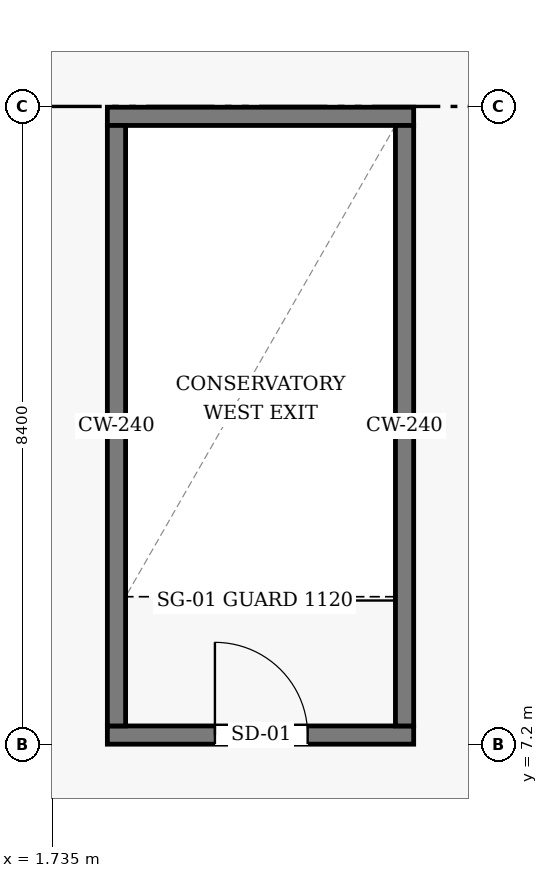
"""IFC4 building model, lengths in metres.
Left out: names, types, materials, properties, quantities, classifications, styles, units other than length and angle.
Written with IfcOpenShell. Run it as: python <this file> out.ifc"""

import sys

from ifc_helpers import new_model, si_unit, direction, frame, frame_2d, origin, place, context, subcontext, project, spatial, rectangle, extrude, element, fill, save


model = new_model("IFC4")
c1 = context("Model", 3, precision=1e-05, world=origin(), true_north=direction((0.0, 1.0)))
c2 = subcontext(c1, "Body", "Model", "MODEL_VIEW")
j1 = project(units=[si_unit("LENGTHUNIT", "METRE"), si_unit("PLANEANGLEUNIT", "RADIAN")], contexts=[c1])
p1 = place(None, origin())
s1 = spatial("IfcSite", under=j1, at=p1, CompositionType="ELEMENT")
p2 = place(p1, origin())
s2 = spatial("IfcBuilding", under=s1, at=p2, CompositionType="ELEMENT")
p3 = place(p2, frame((0.0, 0.0, 4.8)))
s3 = spatial("IfcBuildingStorey", under=s2, at=p3, CompositionType="ELEMENT", Elevation=4.8)
p4 = place(p3, frame((2.46, 7.33, 0.0), z_axis=(0.0, 0.0, 1.0), x_axis=(1.0, 0.0, 0.0)))
e1 = element("IfcWall", 1, at=p4, inside=s3, PredefinedType="SHEAR", context=c2, shape_type="SweptSolid", body=[
    extrude(rectangle(XDim=4.03, YDim=0.24, at=frame_2d((2.015, 0.0))), origin(), (0.0, 0.0, 1.0), 3.955),
])
p5 = place(p4, frame((1.415, 0.0, 0.0)))
e2 = element("IfcOpeningElement", 2, at=p5, cuts=e1, PredefinedType="OPENING", context=c2, shape_type="SweptSolid", body=[
    extrude(rectangle(XDim=1.22, YDim=2.18, at=frame_2d((0.61, 1.09))), frame((0.0, 0.13, 0.0), z_axis=(0.0, -1.0, 0.0), x_axis=(1.0, 0.0, 0.0)), (0.0, 0.0, 1.0), 0.26),
])
p6 = place(p3, frame((2.46, 15.47, 0.0), z_axis=(0.0, 0.0, 1.0), x_axis=(1.0, 0.0, 0.0)))
e3 = element("IfcWall", 3, at=p6, inside=s3, PredefinedType="SHEAR", context=c2, shape_type="SweptSolid", body=[
    extrude(rectangle(XDim=4.03, YDim=0.24, at=frame_2d((2.015, 0.0))), origin(), (0.0, 0.0, 1.0), 3.955),
])
for number, where, z_axis, x_axis in (
    (4, (2.58, 7.45, 0.0), (0.0, 0.0, 1.0), (0.0, 1.0, 0.0)),
    (5, (6.37, 7.45, 0.0), (0.0, 0.0, 1.0), (0.0, 1.0, 0.0)),
):
    element("IfcWall", number, at=place(p3, frame(where, z_axis=z_axis, x_axis=x_axis)), inside=s3, PredefinedType="SHEAR", context=c2, shape_type="SweptSolid", body=[
        extrude(rectangle(XDim=7.9, YDim=0.24, at=frame_2d((3.95, 0.0))), origin(), (0.0, 0.0, 1.0), 3.955),
    ])
p7 = place(p5, origin())
e6 = element("IfcDoor", 6, at=p7, inside=s3, OperationType="SINGLE_SWING_LEFT", PredefinedType="DOOR", context=c2, shape_type="SweptSolid", body=[
    extrude(rectangle(XDim=1.22, YDim=2.18, at=frame_2d((0.61, 1.09))), frame((0.0, 0.025, 0.0), z_axis=(0.0, -1.0, 0.0), x_axis=(1.0, 0.0, 0.0)), (0.0, 0.0, 1.0), 0.05),
])
fill(e2, e6)
save(model, sys.argv[1])
